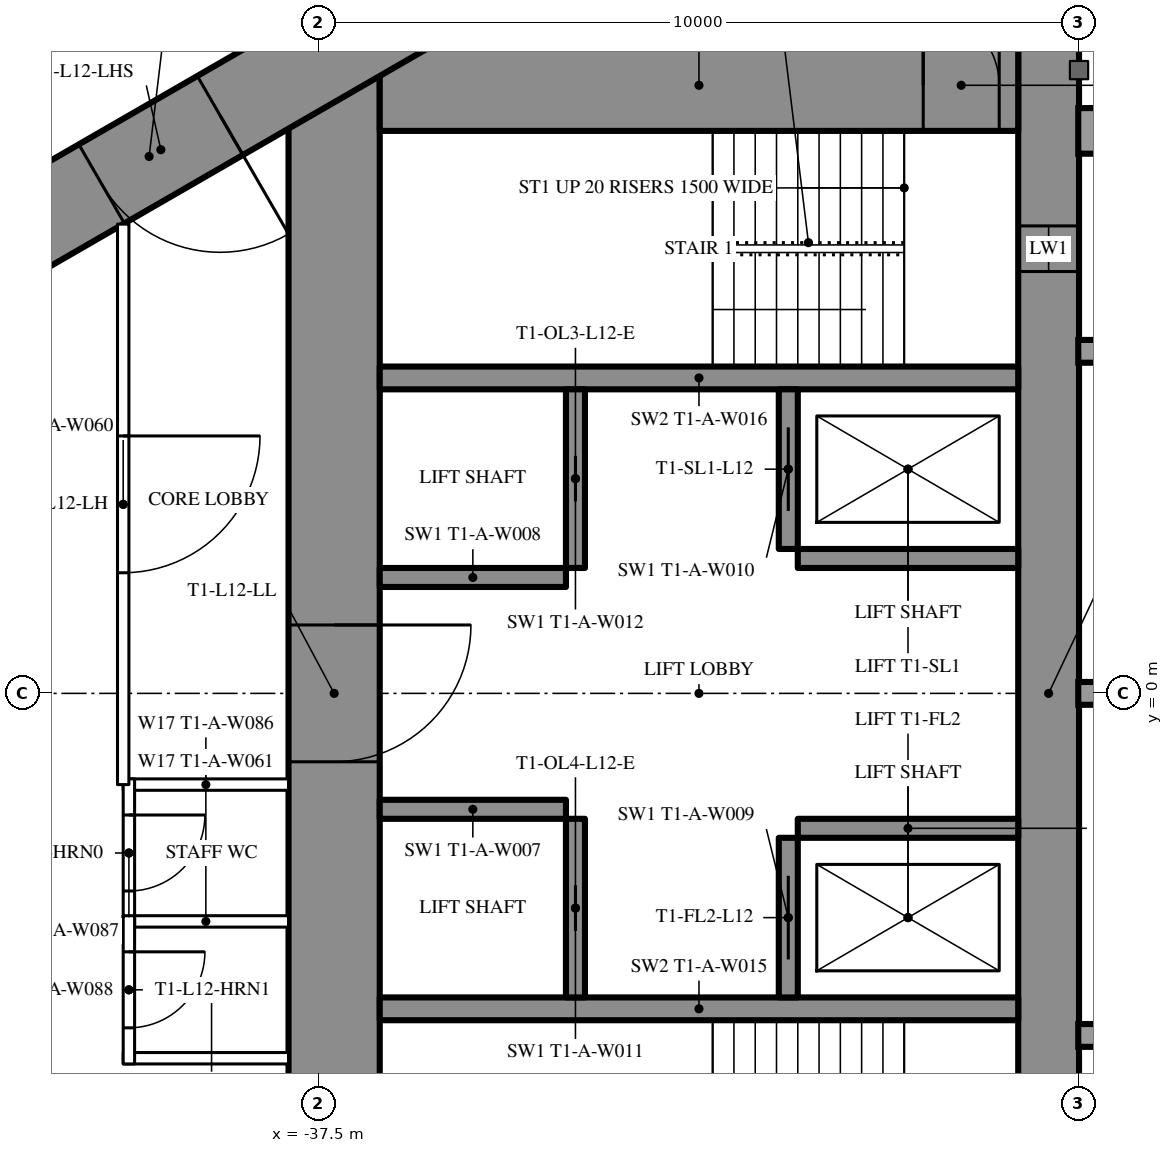
"""IFC4 building model, lengths in metres.
Left out: names, types, materials, properties, quantities, classifications, styles, units other than length and angle.
Written with IfcOpenShell. Run it as: python <this file> out.ifc"""

import sys

from ifc_helpers import new_model, si_unit, direction, frame, frame_2d, origin, place, context, subcontext, project, spatial, rectangle, extrude, element, fill, save


model = new_model("IFC4")
c1 = context("Model", 3, precision=1e-05, world=origin(), true_north=direction((0.0, 1.0)))
c2 = subcontext(c1, "Body", "Model", "MODEL_VIEW")
j1 = project(units=[si_unit("LENGTHUNIT", "METRE"), si_unit("PLANEANGLEUNIT", "RADIAN")], contexts=[c1])
p1 = place(None, origin())
s1 = spatial("IfcSite", under=j1, at=p1, CompositionType="ELEMENT")
p2 = place(p1, origin())
s2 = spatial("IfcBuilding", under=s1, at=p2, CompositionType="ELEMENT")
p3 = place(p2, frame((0.0, 0.0, 49.5)))
s3 = spatial("IfcBuildingStorey", under=s2, at=p3, CompositionType="ELEMENT", Elevation=49.5)
p4 = place(p3, frame((-27.9, 8.6, 0.0), z_axis=(0.0, 0.0, 1.0), x_axis=(0.0, -1.0, 0.0)))
e1 = element("IfcWall", 1, at=p4, inside=s3, PredefinedType="SHEAR", context=c2, shape_type="SweptSolid", body=[
    extrude(rectangle(XDim=17.2, YDim=0.8, at=frame_2d((8.6, 0.0))), origin(), (0.0, 0.0, 1.0), 3.5),
])
p5 = place(p4, frame((2.45, 0.0, 0.6)))
e2 = element("IfcOpeningElement", 2, at=p5, cuts=e1, PredefinedType="OPENING", context=c2, shape_type="SweptSolid", body=[
    extrude(rectangle(XDim=0.6, YDim=2.1, at=frame_2d((0.3, 1.05))), frame((0.0, 0.41, 0.0), z_axis=(0.0, -1.0, 0.0), x_axis=(1.0, 0.0, 0.0)), (0.0, 0.0, 1.0), 0.82),
])
p6 = place(p4, frame((14.15, 0.0, 0.6)))
e3 = element("IfcOpeningElement", 3, at=p6, cuts=e1, PredefinedType="OPENING", context=c2, shape_type="SweptSolid", body=[
    extrude(rectangle(XDim=0.6, YDim=2.1, at=frame_2d((0.3, 1.05))), frame((0.0, 0.41, 0.0), z_axis=(0.0, -1.0, 0.0), x_axis=(1.0, 0.0, 0.0)), (0.0, 0.0, 1.0), 0.82),
])
p7 = place(p3, frame((-37.3, 8.6, 0.0), z_axis=(0.0, 0.0, 1.0), x_axis=(0.0, -1.0, 0.0)))
e4 = element("IfcWall", 4, at=p7, inside=s3, PredefinedType="SHEAR", context=c2, shape_type="SweptSolid", body=[
    extrude(rectangle(XDim=17.2, YDim=1.2, at=frame_2d((8.6, 0.0))), origin(), (0.0, 0.0, 1.0), 3.5),
])
p8 = place(p7, frame((7.7, 0.0, 0.0)))
e5 = element("IfcOpeningElement", 5, at=p8, cuts=e4, PredefinedType="OPENING", context=c2, shape_type="SweptSolid", body=[
    extrude(rectangle(XDim=1.8, YDim=2.2, at=frame_2d((0.9, 1.1))), frame((0.0, 0.61, 0.0), z_axis=(0.0, -1.0, 0.0), x_axis=(1.0, 0.0, 0.0)), (0.0, 0.0, 1.0), 1.22),
])
p9 = place(p3, frame((-28.3, 8.0, 0.0), z_axis=(0.0, 0.0, 1.0), x_axis=(-1.0, 0.0, 0.0)))
e6 = element("IfcWall", 6, at=p9, inside=s3, PredefinedType="SHEAR", context=c2, shape_type="SweptSolid", body=[
    extrude(rectangle(XDim=8.4, YDim=1.2, at=frame_2d((4.2, 0.0))), origin(), (0.0, 0.0, 1.0), 3.5),
])
p10 = place(p9, frame((0.25, 0.0, 0.0)))
e7 = element("IfcOpeningElement", 7, at=p10, cuts=e6, PredefinedType="OPENING", context=c2, shape_type="SweptSolid", body=[
    extrude(rectangle(XDim=1.0, YDim=2.2, at=frame_2d((0.5, 1.1))), frame((0.0, 0.61, 0.0), z_axis=(0.0, -1.0, 0.0), x_axis=(1.0, 0.0, 0.0)), (0.0, 0.0, 1.0), 1.22),
])
for number, where, z_axis, x_axis in (
    (8, (-28.3, 4.15, 0.0), (0.0, 0.0, 1.0), (-1.0, 0.0, 0.0)),
    (9, (-28.3, -4.15, 0.0), (0.0, 0.0, 1.0), (-1.0, 0.0, 0.0)),
):
    element("IfcWall", number, at=place(p3, frame(where, z_axis=z_axis, x_axis=x_axis)), inside=s3, PredefinedType="SHEAR", context=c2, shape_type="SweptSolid", body=[
        extrude(rectangle(XDim=8.4, YDim=0.3, at=frame_2d((4.2, 0.0))), origin(), (0.0, 0.0, 1.0), 3.5),
    ])
p11 = place(p3, frame((-31.325, 4.0, 0.0), z_axis=(0.0, 0.0, 1.0), x_axis=(0.0, -1.0, 0.0)))
e10 = element("IfcWall", 10, at=p11, inside=s3, PredefinedType="SHEAR", context=c2, shape_type="SweptSolid", body=[
    extrude(rectangle(XDim=2.1, YDim=0.25, at=frame_2d((1.05, 0.0))), origin(), (0.0, 0.0, 1.0), 3.5),
])
p12 = place(p11, frame((0.5, 0.0, 0.0)))
e11 = element("IfcOpeningElement", 11, at=p12, cuts=e10, PredefinedType="OPENING", context=c2, shape_type="SweptSolid", body=[
    extrude(rectangle(XDim=1.1, YDim=2.2, at=frame_2d((0.55, 1.1))), frame((0.0, 0.135, 0.0), z_axis=(0.0, -1.0, 0.0), x_axis=(1.0, 0.0, 0.0)), (0.0, 0.0, 1.0), 0.27),
])
p13 = place(p3, frame((-34.125, 4.0, 0.0), z_axis=(0.0, 0.0, 1.0), x_axis=(0.0, -1.0, 0.0)))
e12 = element("IfcWall", 12, at=p13, inside=s3, PredefinedType="SHEAR", context=c2, shape_type="SweptSolid", body=[
    extrude(rectangle(XDim=2.35, YDim=0.25, at=frame_2d((1.175, 0.0))), origin(), (0.0, 0.0, 1.0), 3.5),
])
p14 = place(p13, frame((0.875, 0.0, 0.0)))
e13 = element("IfcOpeningElement", 13, at=p14, cuts=e12, PredefinedType="OPENING", context=c2, shape_type="SweptSolid", body=[
    extrude(rectangle(XDim=0.6, YDim=2.0, at=frame_2d((0.3, 1.0))), frame((0.0, 0.135, 0.0), z_axis=(0.0, -1.0, 0.0), x_axis=(1.0, 0.0, 0.0)), (0.0, 0.0, 1.0), 0.27),
])
p15 = place(p3, frame((-28.3, 1.775, 0.0), z_axis=(0.0, 0.0, 1.0), x_axis=(-1.0, 0.0, 0.0)))
e14 = element("IfcWall", 14, at=p15, inside=s3, PredefinedType="SHEAR", context=c2, shape_type="SweptSolid", body=[
    extrude(rectangle(XDim=2.9, YDim=0.25, at=frame_2d((1.45, 0.0))), origin(), (0.0, 0.0, 1.0), 3.5),
])
p16 = place(p3, frame((-34.25, 1.525, 0.0), z_axis=(0.0, 0.0, 1.0), x_axis=(-1.0, 0.0, 0.0)))
e15 = element("IfcWall", 15, at=p16, inside=s3, PredefinedType="SHEAR", context=c2, shape_type="SweptSolid", body=[
    extrude(rectangle(XDim=2.45, YDim=0.25, at=frame_2d((1.225, 0.0))), origin(), (0.0, 0.0, 1.0), 3.5),
])
p17 = place(p3, frame((-31.325, -1.9, 0.0), z_axis=(0.0, 0.0, 1.0), x_axis=(0.0, -1.0, 0.0)))
e16 = element("IfcWall", 16, at=p17, inside=s3, PredefinedType="SHEAR", context=c2, shape_type="SweptSolid", body=[
    extrude(rectangle(XDim=2.1, YDim=0.25, at=frame_2d((1.05, 0.0))), origin(), (0.0, 0.0, 1.0), 3.5),
])
p18 = place(p17, frame((0.5, 0.0, 0.0)))
e17 = element("IfcOpeningElement", 17, at=p18, cuts=e16, PredefinedType="OPENING", context=c2, shape_type="SweptSolid", body=[
    extrude(rectangle(XDim=1.1, YDim=2.2, at=frame_2d((0.55, 1.1))), frame((0.0, 0.135, 0.0), z_axis=(0.0, -1.0, 0.0), x_axis=(1.0, 0.0, 0.0)), (0.0, 0.0, 1.0), 0.27),
])
p19 = place(p3, frame((-34.125, -1.65, 0.0), z_axis=(0.0, 0.0, 1.0), x_axis=(0.0, -1.0, 0.0)))
e18 = element("IfcWall", 18, at=p19, inside=s3, PredefinedType="SHEAR", context=c2, shape_type="SweptSolid", body=[
    extrude(rectangle(XDim=2.35, YDim=0.25, at=frame_2d((1.175, 0.0))), origin(), (0.0, 0.0, 1.0), 3.5),
])
p20 = place(p19, frame((0.875, 0.0, 0.0)))
e19 = element("IfcOpeningElement", 19, at=p20, cuts=e18, PredefinedType="OPENING", context=c2, shape_type="SweptSolid", body=[
    extrude(rectangle(XDim=0.6, YDim=2.0, at=frame_2d((0.3, 1.0))), frame((0.0, 0.135, 0.0), z_axis=(0.0, -1.0, 0.0), x_axis=(1.0, 0.0, 0.0)), (0.0, 0.0, 1.0), 0.27),
])
p21 = place(p3, frame((-28.3, -1.775, 0.0), z_axis=(0.0, 0.0, 1.0), x_axis=(-1.0, 0.0, 0.0)))
e20 = element("IfcWall", 20, at=p21, inside=s3, PredefinedType="SHEAR", context=c2, shape_type="SweptSolid", body=[
    extrude(rectangle(XDim=2.9, YDim=0.25, at=frame_2d((1.45, 0.0))), origin(), (0.0, 0.0, 1.0), 3.5),
])
p22 = place(p3, frame((-34.25, -1.525, 0.0), z_axis=(0.0, 0.0, 1.0), x_axis=(-1.0, 0.0, 0.0)))
e21 = element("IfcWall", 21, at=p22, inside=s3, PredefinedType="SHEAR", context=c2, shape_type="SweptSolid", body=[
    extrude(rectangle(XDim=2.45, YDim=0.25, at=frame_2d((1.225, 0.0))), origin(), (0.0, 0.0, 1.0), 3.5),
])
p23 = place(p3, frame((-27.2, 14.3, 0.0), z_axis=(0.0, 0.0, 1.0), x_axis=(-0.866026593062, -0.499997940104, 0.0)))
e22 = element("IfcWall", 22, at=p23, inside=s3, PredefinedType="SHEAR", context=c2, shape_type="SweptSolid", body=[
    extrude(rectangle(XDim=28.946, YDim=1.2, at=frame_2d((14.473, 0.0))), origin(), (0.0, 0.0, 1.0), 3.5),
])
p24 = place(p23, frame((4.6, 0.0, 0.0)))
e23 = element("IfcOpeningElement", 23, at=p24, cuts=e22, PredefinedType="OPENING", context=c2, shape_type="SweptSolid", body=[
    extrude(rectangle(XDim=1.0, YDim=2.2, at=frame_2d((0.5, 1.1))), frame((0.0, 0.61, 0.0), z_axis=(0.0, -1.0, 0.0), x_axis=(1.0, 0.0, 0.0)), (0.0, 0.0, 1.0), 1.22),
])
p25 = place(p23, frame((13.395, 0.0, 0.0)))
e24 = element("IfcOpeningElement", 24, at=p25, cuts=e22, PredefinedType="OPENING", context=c2, shape_type="SweptSolid", body=[
    extrude(rectangle(XDim=1.8, YDim=2.2, at=frame_2d((0.9, 1.1))), frame((0.0, 0.61, 0.0), z_axis=(0.0, -1.0, 0.0), x_axis=(1.0, 0.0, 0.0)), (0.0, 0.0, 1.0), 1.22),
])
p26 = place(p3, frame((-27.2, -14.3, 0.0), z_axis=(0.0, 0.0, 1.0), x_axis=(-0.866024021859, 0.500002393557, 0.0)))
e25 = element("IfcWall", 25, at=p26, inside=s3, PredefinedType="SHEAR", context=c2, shape_type="SweptSolid", body=[
    extrude(rectangle(XDim=27.907, YDim=1.2, at=frame_2d((13.954, 0.0))), origin(), (0.0, 0.0, 1.0), 3.5),
])
p27 = place(p26, frame((4.6, 0.0, 0.0)))
e26 = element("IfcOpeningElement", 26, at=p27, cuts=e25, PredefinedType="OPENING", context=c2, shape_type="SweptSolid", body=[
    extrude(rectangle(XDim=1.0, YDim=2.2, at=frame_2d((0.5, 1.1))), frame((0.0, 0.61, 0.0), z_axis=(0.0, -1.0, 0.0), x_axis=(1.0, 0.0, 0.0)), (0.0, 0.0, 1.0), 1.22),
])
p28 = place(p26, frame((13.395, 0.0, 0.0)))
e27 = element("IfcOpeningElement", 27, at=p28, cuts=e25, PredefinedType="OPENING", context=c2, shape_type="SweptSolid", body=[
    extrude(rectangle(XDim=1.8, YDim=2.2, at=frame_2d((0.9, 1.1))), frame((0.0, 0.61, 0.0), z_axis=(0.0, -1.0, 0.0), x_axis=(1.0, 0.0, 0.0)), (0.0, 0.0, 1.0), 1.22),
])
p29 = place(p3, frame((-37.7, 10.894, 0.0), z_axis=(0.0, 0.0, 1.0), x_axis=(-0.866027905338, -0.499995667157, 0.0)))
e28 = element("IfcWall", 28, at=p29, inside=s3, PredefinedType="PARTITIONING", context=c2, shape_type="SweptSolid", body=[
    extrude(rectangle(XDim=21.787, YDim=0.2, at=frame_2d((10.894, 0.0))), origin(), (0.0, 0.0, 1.0), 3.25),
])
p30 = place(p29, frame((20.237, 0.0, 0.0)))
e29 = element("IfcOpeningElement", 29, at=p30, cuts=e28, PredefinedType="OPENING", context=c2, shape_type="SweptSolid", body=[
    extrude(rectangle(XDim=0.95, YDim=2.2, at=frame_2d((0.475, 1.1))), frame((0.0, 0.11, 0.0), z_axis=(0.0, -1.0, 0.0), x_axis=(1.0, 0.0, 0.0)), (0.0, 0.0, 1.0), 0.22),
])
p31 = place(p29, frame((2.95, 0.0, 0.0)))
e30 = element("IfcOpeningElement", 30, at=p31, cuts=e28, PredefinedType="OPENING", context=c2, shape_type="SweptSolid", body=[
    extrude(rectangle(XDim=0.95, YDim=2.2, at=frame_2d((0.475, 1.1))), frame((0.0, 0.11, 0.0), z_axis=(0.0, -1.0, 0.0), x_axis=(1.0, 0.0, 0.0)), (0.0, 0.0, 1.0), 0.22),
])
for number, where, z_axis, x_axis in (
    (31, (-37.9, -1.2, 0.0), (0.0, 0.0, 1.0), (-1.0, 0.0, 0.0)),
    (32, (-37.9, -3.0, 0.0), (0.0, 0.0, 1.0), (-1.0, 0.0, 0.0)),
    (33, (-37.9, -4.8, 0.0), (0.0, 0.0, 1.0), (-1.0, 0.0, 0.0)),
):
    element("IfcWall", number, at=place(p3, frame(where, z_axis=z_axis, x_axis=x_axis)), inside=s3, PredefinedType="PARTITIONING", context=c2, shape_type="SweptSolid", body=[
        extrude(rectangle(XDim=2.175, YDim=0.15, at=frame_2d((1.087, 0.0))), origin(), (0.0, 0.0, 1.0), 3.25),
    ])
p32 = place(p3, frame((-40.0, -1.125, 0.0), z_axis=(0.0, 0.0, 1.0), x_axis=(0.0, -1.0, 0.0)))
e34 = element("IfcWall", 34, at=p32, inside=s3, PredefinedType="PARTITIONING", context=c2, shape_type="SweptSolid", body=[
    extrude(rectangle(XDim=1.95, YDim=0.15, at=frame_2d((0.975, 0.0))), origin(), (0.0, 0.0, 1.0), 3.25),
])
p33 = place(p32, frame((0.475, 0.0, 0.0)))
e35 = element("IfcOpeningElement", 35, at=p33, cuts=e34, PredefinedType="OPENING", context=c2, shape_type="SweptSolid", body=[
    extrude(rectangle(XDim=1.0, YDim=2.2, at=frame_2d((0.5, 1.1))), frame((0.0, 0.085, 0.0), z_axis=(0.0, -1.0, 0.0), x_axis=(1.0, 0.0, 0.0)), (0.0, 0.0, 1.0), 0.17),
])
p34 = place(p3, frame((-40.0, -2.925, 0.0), z_axis=(0.0, 0.0, 1.0), x_axis=(0.0, -1.0, 0.0)))
e36 = element("IfcWall", 36, at=p34, inside=s3, PredefinedType="PARTITIONING", context=c2, shape_type="SweptSolid", body=[
    extrude(rectangle(XDim=1.95, YDim=0.15, at=frame_2d((0.975, 0.0))), origin(), (0.0, 0.0, 1.0), 3.25),
])
p35 = place(p34, frame((0.475, 0.0, 0.0)))
e37 = element("IfcOpeningElement", 37, at=p35, cuts=e36, PredefinedType="OPENING", context=c2, shape_type="SweptSolid", body=[
    extrude(rectangle(XDim=1.0, YDim=2.2, at=frame_2d((0.5, 1.1))), frame((0.0, 0.085, 0.0), z_axis=(0.0, -1.0, 0.0), x_axis=(1.0, 0.0, 0.0)), (0.0, 0.0, 1.0), 0.17),
])
p36 = place(p3, frame((-40.075, 6.174, 0.0), z_axis=(0.0, 0.0, 1.0), x_axis=(0.0, -1.0, 0.0)))
e38 = element("IfcWall", 38, at=p36, inside=s3, PredefinedType="PARTITIONING", context=c2, shape_type="SweptSolid", body=[
    extrude(rectangle(XDim=7.374, YDim=0.15, at=frame_2d((3.687, 0.0))), origin(), (0.0, 0.0, 1.0), 3.25),
])
p37 = place(p36, frame((2.787, 0.0, 0.0)))
e39 = element("IfcOpeningElement", 39, at=p37, cuts=e38, PredefinedType="OPENING", context=c2, shape_type="SweptSolid", body=[
    extrude(rectangle(XDim=1.8, YDim=2.2, at=frame_2d((0.9, 1.1))), frame((0.0, 0.085, 0.0), z_axis=(0.0, -1.0, 0.0), x_axis=(1.0, 0.0, 0.0)), (0.0, 0.0, 1.0), 0.17),
])
p38 = place(p33, origin())
e40 = element("IfcDoor", 40, at=p38, inside=s3, OperationType="SINGLE_SWING_LEFT", PredefinedType="DOOR", context=c2, shape_type="SweptSolid", body=[
    extrude(rectangle(XDim=1.0, YDim=2.2, at=frame_2d((0.5, 1.1))), frame((0.0, 0.025, 0.0), z_axis=(0.0, -1.0, 0.0), x_axis=(1.0, 0.0, 0.0)), (0.0, 0.0, 1.0), 0.05),
])
fill(e35, e40)
p39 = place(p35, origin())
e41 = element("IfcDoor", 41, at=p39, inside=s3, OperationType="SINGLE_SWING_LEFT", PredefinedType="DOOR", context=c2, shape_type="SweptSolid", body=[
    extrude(rectangle(XDim=1.0, YDim=2.2, at=frame_2d((0.5, 1.1))), frame((0.0, 0.025, 0.0), z_axis=(0.0, -1.0, 0.0), x_axis=(1.0, 0.0, 0.0)), (0.0, 0.0, 1.0), 0.05),
])
fill(e37, e41)
p40 = place(p37, origin())
e42 = element("IfcDoor", 42, at=p40, inside=s3, OperationType="DOUBLE_DOOR_SINGLE_SWING", PredefinedType="DOOR", context=c2, shape_type="SweptSolid", body=[
    extrude(rectangle(XDim=1.8, YDim=2.2, at=frame_2d((0.9, 1.1))), frame((0.0, 0.025, 0.0), z_axis=(0.0, -1.0, 0.0), x_axis=(1.0, 0.0, 0.0)), (0.0, 0.0, 1.0), 0.05),
])
fill(e39, e42)
p41 = place(p25, origin())
e43 = element("IfcDoor", 43, at=p41, inside=s3, OperationType="DOUBLE_DOOR_SINGLE_SWING", PredefinedType="DOOR", context=c2, shape_type="SweptSolid", body=[
    extrude(rectangle(XDim=1.8, YDim=2.2, at=frame_2d((0.9, 1.1))), frame((0.0, 0.025, 0.0), z_axis=(0.0, -1.0, 0.0), x_axis=(1.0, 0.0, 0.0)), (0.0, 0.0, 1.0), 0.05),
])
fill(e24, e43)
p42 = place(p8, origin())
e44 = element("IfcDoor", 44, at=p42, inside=s3, OperationType="DOUBLE_DOOR_SINGLE_SWING", PredefinedType="DOOR", context=c2, shape_type="SweptSolid", body=[
    extrude(rectangle(XDim=1.8, YDim=2.2, at=frame_2d((0.9, 1.1))), frame((0.0, 0.025, 0.0), z_axis=(0.0, -1.0, 0.0), x_axis=(1.0, 0.0, 0.0)), (0.0, 0.0, 1.0), 0.05),
])
fill(e5, e44)
p43 = place(p10, origin())
e45 = element("IfcDoor", 45, at=p43, inside=s3, OperationType="SINGLE_SWING_RIGHT", PredefinedType="DOOR", context=c2, shape_type="SweptSolid", body=[
    extrude(rectangle(XDim=1.0, YDim=2.2, at=frame_2d((0.5, 1.1))), frame((0.0, 0.025, 0.0), z_axis=(0.0, -1.0, 0.0), x_axis=(1.0, 0.0, 0.0)), (0.0, 0.0, 1.0), 0.05),
])
fill(e7, e45)
p44 = place(p12, origin())
e46 = element("IfcDoor", 46, at=p44, inside=s3, OperationType="SLIDING_TO_LEFT", PredefinedType="USERDEFINED", context=c2, shape_type="SweptSolid", body=[
    extrude(rectangle(XDim=1.1, YDim=2.2, at=frame_2d((0.55, 1.1))), frame((0.0, 0.025, 0.0), z_axis=(0.0, -1.0, 0.0), x_axis=(1.0, 0.0, 0.0)), (0.0, 0.0, 1.0), 0.05),
])
fill(e11, e46)
p45 = place(p18, origin())
e47 = element("IfcDoor", 47, at=p45, inside=s3, OperationType="SLIDING_TO_LEFT", PredefinedType="USERDEFINED", context=c2, shape_type="SweptSolid", body=[
    extrude(rectangle(XDim=1.1, YDim=2.2, at=frame_2d((0.55, 1.1))), frame((0.0, 0.025, 0.0), z_axis=(0.0, -1.0, 0.0), x_axis=(1.0, 0.0, 0.0)), (0.0, 0.0, 1.0), 0.05),
])
fill(e17, e47)
p46 = place(p14, origin())
e48 = element("IfcDoor", 48, at=p46, inside=s3, OperationType="SLIDING_TO_LEFT", PredefinedType="DOOR", context=c2, shape_type="SweptSolid", body=[
    extrude(rectangle(XDim=0.6, YDim=2.0, at=frame_2d((0.3, 1.0))), frame((0.0, 0.025, 0.0), z_axis=(0.0, -1.0, 0.0), x_axis=(1.0, 0.0, 0.0)), (0.0, 0.0, 1.0), 0.05),
])
fill(e13, e48)
p47 = place(p20, origin())
e49 = element("IfcDoor", 49, at=p47, inside=s3, OperationType="SLIDING_TO_LEFT", PredefinedType="DOOR", context=c2, shape_type="SweptSolid", body=[
    extrude(rectangle(XDim=0.6, YDim=2.0, at=frame_2d((0.3, 1.0))), frame((0.0, 0.025, 0.0), z_axis=(0.0, -1.0, 0.0), x_axis=(1.0, 0.0, 0.0)), (0.0, 0.0, 1.0), 0.05),
])
fill(e19, e49)
p48 = place(p5, origin())
e50 = element("IfcWindow", 50, at=p48, inside=s3, PartitioningType="SINGLE_PANEL", PredefinedType="WINDOW", context=c2, shape_type="SweptSolid", body=[
    extrude(rectangle(XDim=0.6, YDim=2.1, at=frame_2d((0.3, 1.05))), frame((0.0, 0.03, 0.0), z_axis=(0.0, -1.0, 0.0), x_axis=(1.0, 0.0, 0.0)), (0.0, 0.0, 1.0), 0.06),
])
fill(e2, e50)
save(model, sys.argv[1])
